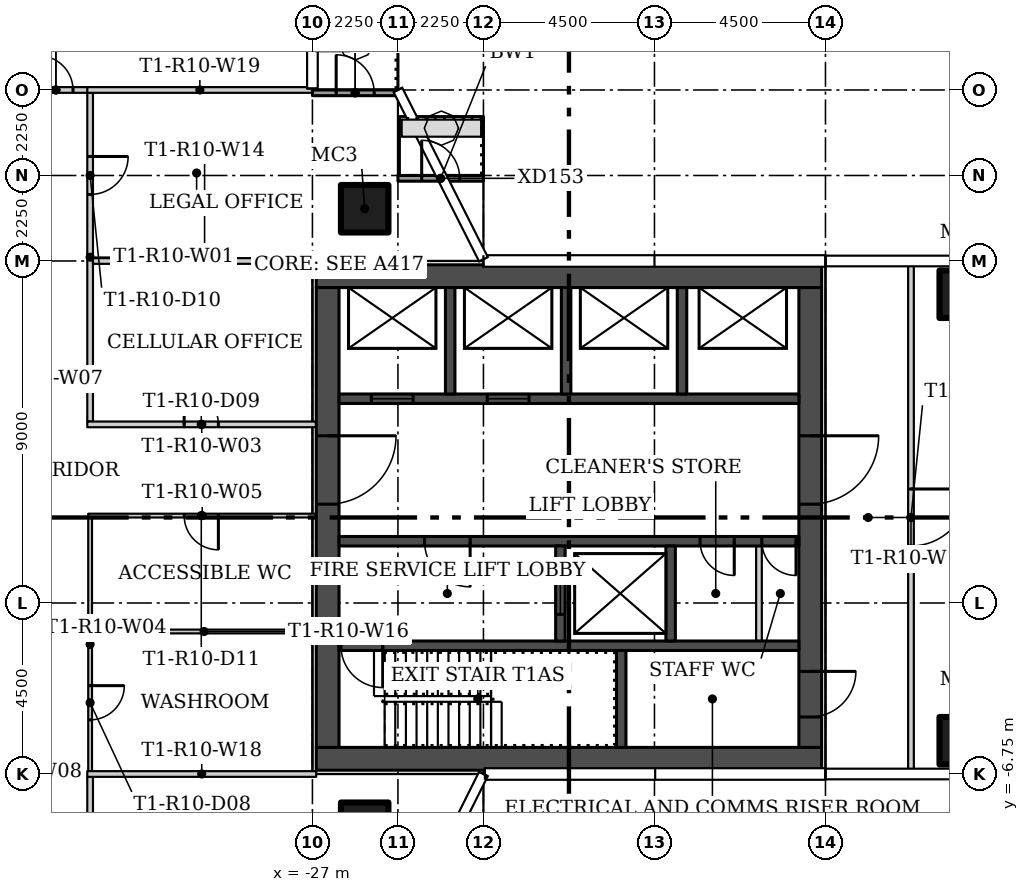
"""IFC4 building model, lengths in metres.
Left out: names, types, materials, properties, quantities, classifications, styles, units other than length and angle.
Written with IfcOpenShell. Run it as: python <this file> out.ifc"""

import sys

from ifc_helpers import new_model, si_unit, direction, frame, frame_2d, origin, origin_2d, place, context, subcontext, project, spatial, rectangle, hollow_rectangle, extrude, element, fill, save


model = new_model("IFC4")
c1 = context("Model", 3, precision=1e-05, world=origin(), true_north=direction((0.0, 1.0)))
c2 = subcontext(c1, "Body", "Model", "MODEL_VIEW")
j1 = project(units=[si_unit("LENGTHUNIT", "METRE"), si_unit("PLANEANGLEUNIT", "RADIAN")], contexts=[c1])
p1 = place(None, origin())
s1 = spatial("IfcSite", under=j1, at=p1, CompositionType="ELEMENT")
p2 = place(p1, origin())
s2 = spatial("IfcBuilding", under=s1, at=p2, CompositionType="ELEMENT")
p3 = place(p2, frame((0.0, 0.0, 105.3)))
s3 = spatial("IfcBuildingStorey", under=s2, at=p3, CompositionType="ELEMENT", Elevation=105.3)
for number, where in (
    (1, (-25.625, 8.125, 0.0)),
    (2, (-25.625, -8.125, 0.0)),
    (3, (-9.875, -5.875, 0.0)),
    (4, (-9.875, 5.875, 0.0)),
):
    element("IfcColumn", number, at=place(p3, frame(where)), inside=s3, PredefinedType="COLUMN", context=c2, shape_type="SweptSolid", body=[
        extrude(hollow_rectangle(XDim=1.25, YDim=1.25, WallThickness=0.05, at=origin_2d()), origin(), (0.0, 0.0, 1.0), 3.55),
    ])
p4 = place(p3, frame((-32.85, 11.175, 0.0), z_axis=(0.0, 0.0, 1.0), x_axis=(0.0, -1.0, 0.0)))
e5 = element("IfcWall", 5, at=p4, inside=s3, PredefinedType="PARTITIONING", context=c2, shape_type="SweptSolid", body=[
    extrude(rectangle(XDim=8.65, YDim=0.15, at=frame_2d((4.325, 0.0))), origin(), (0.0, 0.0, 1.0), 3.55),
])
p5 = place(p4, frame((1.675, 0.0, 0.0)))
e6 = element("IfcOpeningElement", 6, at=p5, cuts=e5, PredefinedType="OPENING", context=c2, shape_type="SweptSolid", body=[
    extrude(rectangle(XDim=1.0, YDim=2.4, at=frame_2d((0.5, 1.2))), frame((0.0, 0.085, 0.0), z_axis=(0.0, -1.0, 0.0), x_axis=(1.0, 0.0, 0.0)), (0.0, 0.0, 1.0), 0.17),
])
p6 = place(p3, frame((-32.85, -6.825, 0.0), z_axis=(0.0, 0.0, 1.0), x_axis=(0.0, -1.0, 0.0)))
e7 = element("IfcWall", 7, at=p6, inside=s3, PredefinedType="PARTITIONING", context=c2, shape_type="SweptSolid", body=[
    extrude(rectangle(XDim=4.35, YDim=0.15, at=frame_2d((2.175, 0.0))), origin(), (0.0, 0.0, 1.0), 3.55),
])
p7 = place(p6, frame((1.425, 0.0, 0.0)))
e8 = element("IfcOpeningElement", 8, at=p7, cuts=e7, PredefinedType="OPENING", context=c2, shape_type="SweptSolid", body=[
    extrude(rectangle(XDim=1.5, YDim=2.1, at=frame_2d((0.75, 1.05))), frame((0.0, 0.085, 0.0), z_axis=(0.0, -1.0, 0.0), x_axis=(1.0, 0.0, 0.0)), (0.0, 0.0, 1.0), 0.17),
])
p8 = place(p3, frame((-32.925, 2.45, 0.0)))
e9 = element("IfcWall", 9, at=p8, inside=s3, PredefinedType="PARTITIONING", context=c2, shape_type="SweptSolid", body=[
    extrude(rectangle(XDim=6.025, YDim=0.15, at=frame_2d((3.012, 0.0))), origin(), (0.0, 0.0, 1.0), 3.55),
])
p9 = place(p8, frame((2.55, 0.0, 0.0)))
e10 = element("IfcOpeningElement", 10, at=p9, cuts=e9, PredefinedType="OPENING", context=c2, shape_type="SweptSolid", body=[
    extrude(rectangle(XDim=0.9, YDim=2.1, at=frame_2d((0.45, 1.05))), frame((0.0, 0.085, 0.0), z_axis=(0.0, -1.0, 0.0), x_axis=(1.0, 0.0, 0.0)), (0.0, 0.0, 1.0), 0.17),
])
p10 = place(p3, frame((-32.85, -0.0, 0.0), z_axis=(0.0, 0.0, 1.0), x_axis=(0.0, -1.0, 0.0)))
e11 = element("IfcWall", 11, at=p10, inside=s3, PredefinedType="PARTITIONING", context=c2, shape_type="SweptSolid", body=[
    extrude(rectangle(XDim=6.675, YDim=0.1, at=frame_2d((3.337, 0.0))), origin(), (0.0, 0.0, 1.0), 3.55),
])
p11 = place(p10, frame((4.425, 0.0, 0.0)))
e12 = element("IfcOpeningElement", 12, at=p11, cuts=e11, PredefinedType="OPENING", context=c2, shape_type="SweptSolid", body=[
    extrude(rectangle(XDim=0.9, YDim=2.1, at=frame_2d((0.45, 1.05))), frame((0.0, 0.06, 0.0), z_axis=(0.0, -1.0, 0.0), x_axis=(1.0, 0.0, 0.0)), (0.0, 0.0, 1.0), 0.12),
])
p12 = place(p3, frame((-26.9, 0.05, 0.0), z_axis=(0.0, 0.0, 1.0), x_axis=(-1.0, 0.0, 0.0)))
e13 = element("IfcWall", 13, at=p12, inside=s3, PredefinedType="PARTITIONING", context=c2, shape_type="SweptSolid", body=[
    extrude(rectangle(XDim=6.0, YDim=0.1, at=frame_2d((3.0, 0.0))), origin(), (0.0, 0.0, 1.0), 3.55),
])
p13 = place(p12, frame((2.575, 0.0, 0.0)))
e14 = element("IfcOpeningElement", 14, at=p13, cuts=e13, PredefinedType="OPENING", context=c2, shape_type="SweptSolid", body=[
    extrude(rectangle(XDim=0.9, YDim=2.1, at=frame_2d((0.45, 1.05))), frame((0.0, 0.06, 0.0), z_axis=(0.0, -1.0, 0.0), x_axis=(1.0, 0.0, 0.0)), (0.0, 0.0, 1.0), 0.12),
])
p14 = place(p3, frame((-34.725, 11.25, 0.0)))
e15 = element("IfcWall", 15, at=p14, inside=s3, PredefinedType="PARTITIONING", context=c2, shape_type="SweptSolid", body=[
    extrude(rectangle(XDim=1.951, YDim=0.15, at=frame_2d((0.975, 0.0))), origin(), (0.0, 0.0, 1.0), 3.55),
])
p15 = place(p14, frame((0.525, 0.0, 0.0)))
e16 = element("IfcOpeningElement", 16, at=p15, cuts=e15, PredefinedType="OPENING", context=c2, shape_type="SweptSolid", body=[
    extrude(rectangle(XDim=0.9, YDim=2.1, at=frame_2d((0.45, 1.05))), frame((0.0, 0.085, 0.0), z_axis=(0.0, -1.0, 0.0), x_axis=(1.0, 0.0, 0.0)), (0.0, 0.0, 1.0), 0.17),
])
p16 = place(p3, frame((-11.25, 6.655, 0.0), z_axis=(0.0, 0.0, 1.0), x_axis=(0.0, -1.0, 0.0)))
e17 = element("IfcWall", 17, at=p16, inside=s3, PredefinedType="PARTITIONING", context=c2, shape_type="SweptSolid", body=[
    extrude(rectangle(XDim=13.31, YDim=0.15, at=frame_2d((6.655, 0.0))), origin(), (0.0, 0.0, 1.0), 3.55),
])
p17 = place(p16, frame((5.905, 0.0, 0.0)))
e18 = element("IfcOpeningElement", 18, at=p17, cuts=e17, PredefinedType="OPENING", context=c2, shape_type="SweptSolid", body=[
    extrude(rectangle(XDim=1.5, YDim=2.1, at=frame_2d((0.75, 1.05))), frame((0.0, 0.085, 0.0), z_axis=(0.0, -1.0, 0.0), x_axis=(1.0, 0.0, 0.0)), (0.0, 0.0, 1.0), 0.17),
])
p18 = place(p3, frame((-26.9, 6.75, 0.0), z_axis=(0.0, 0.0, 1.0), x_axis=(-1.0, 0.0, 0.0)))
e19 = element("IfcWall", 19, at=p18, inside=s3, PredefinedType="PARTITIONING", context=c2, shape_type="SweptSolid", body=[
    extrude(rectangle(XDim=5.875, YDim=0.15, at=frame_2d((2.938, 0.0))), origin(), (0.0, 0.0, 1.0), 3.55),
])
p19 = place(p3, frame((-26.9, -3.0, 0.0), z_axis=(0.0, 0.0, 1.0), x_axis=(-1.0, 0.0, 0.0)))
e20 = element("IfcWall", 20, at=p19, inside=s3, PredefinedType="PARTITIONING", context=c2, shape_type="SweptSolid", body=[
    extrude(rectangle(XDim=5.9, YDim=0.1, at=frame_2d((2.95, 0.0))), origin(), (0.0, 0.0, 1.0), 3.55),
])
p20 = place(p3, frame((-32.925, -6.75, 0.0)))
e21 = element("IfcWall", 21, at=p20, inside=s3, PredefinedType="PARTITIONING", context=c2, shape_type="SweptSolid", body=[
    extrude(rectangle(XDim=6.025, YDim=0.15, at=frame_2d((3.012, 0.0))), origin(), (0.0, 0.0, 1.0), 3.55),
])
p21 = place(p3, frame((-27.0, 11.25, 0.0), z_axis=(0.0, 0.0, 1.0), x_axis=(-1.0, 0.0, 0.0)))
e22 = element("IfcWall", 22, at=p21, inside=s3, PredefinedType="PARTITIONING", context=c2, shape_type="SweptSolid", body=[
    extrude(rectangle(XDim=5.925, YDim=0.15, at=frame_2d((2.962, 0.0))), origin(), (0.0, 0.0, 1.0), 3.55),
])
p22 = place(p3, frame((-24.75, 8.925, 0.0)))
e23 = element("IfcWall", 23, at=p22, inside=s3, PredefinedType="SOLIDWALL", context=c2, shape_type="SweptSolid", body=[
    extrude(rectangle(XDim=2.25, YDim=0.15, at=frame_2d((1.125, 0.0))), origin(), (0.0, 0.0, 1.0), 3.45),
])
p23 = place(p22, frame((0.625, 0.0, 0.0)))
e24 = element("IfcOpeningElement", 24, at=p23, cuts=e23, PredefinedType="OPENING", context=c2, shape_type="SweptSolid", body=[
    extrude(rectangle(XDim=1.0, YDim=2.4, at=frame_2d((0.5, 1.2))), frame((0.0, 0.085, 0.0), z_axis=(0.0, -1.0, 0.0), x_axis=(1.0, 0.0, 0.0)), (0.0, 0.0, 1.0), 0.17),
])
p24 = place(p3, frame((-27.0, 11.175, 0.0)))
e25 = element("IfcWall", 25, at=p24, inside=s3, PredefinedType="SOLIDWALL", context=c2, shape_type="SweptSolid", body=[
    extrude(rectangle(XDim=2.25, YDim=0.15, at=frame_2d((1.125, 0.0))), origin(), (0.0, 0.0, 1.0), 3.45),
])
p25 = place(p24, frame((0.625, 0.0, 0.0)))
e26 = element("IfcOpeningElement", 26, at=p25, cuts=e25, PredefinedType="OPENING", context=c2, shape_type="SweptSolid", body=[
    extrude(rectangle(XDim=1.0, YDim=2.4, at=frame_2d((0.5, 1.2))), frame((0.0, 0.085, 0.0), z_axis=(0.0, -1.0, 0.0), x_axis=(1.0, 0.0, 0.0)), (0.0, 0.0, 1.0), 0.17),
])
for number, where in (
    (27, (-26.9, -6.35, 0.0)),
    (28, (-26.9, 6.35, 0.0)),
):
    element("IfcWall", number, at=place(p3, frame(where)), inside=s3, PredefinedType="SHEAR", context=c2, shape_type="SweptSolid", body=[
        extrude(rectangle(XDim=13.3, YDim=0.6, at=frame_2d((6.65, 0.0))), origin(), (0.0, 0.0, 1.0), 3.55),
    ])
p26 = place(p3, frame((-26.6, 6.05, 0.0), z_axis=(0.0, 0.0, 1.0), x_axis=(0.0, -1.0, 0.0)))
e29 = element("IfcWall", 29, at=p26, inside=s3, PredefinedType="SHEAR", context=c2, shape_type="SweptSolid", body=[
    extrude(rectangle(XDim=12.1, YDim=0.6, at=frame_2d((6.05, 0.0))), origin(), (0.0, 0.0, 1.0), 3.55),
])
p27 = place(p26, frame((3.9, 0.0, 0.0)))
e30 = element("IfcOpeningElement", 30, at=p27, cuts=e29, PredefinedType="OPENING", context=c2, shape_type="SweptSolid", body=[
    extrude(rectangle(XDim=1.8, YDim=2.4, at=frame_2d((0.9, 1.2))), frame((0.0, 0.31, 0.0), z_axis=(0.0, -1.0, 0.0), x_axis=(1.0, 0.0, 0.0)), (0.0, 0.0, 1.0), 0.62),
])
p28 = place(p3, frame((-13.9, 6.05, 0.0), z_axis=(0.0, 0.0, 1.0), x_axis=(0.0, -1.0, 0.0)))
e31 = element("IfcWall", 31, at=p28, inside=s3, PredefinedType="SHEAR", context=c2, shape_type="SweptSolid", body=[
    extrude(rectangle(XDim=12.1, YDim=0.6, at=frame_2d((6.05, 0.0))), origin(), (0.0, 0.0, 1.0), 3.55),
])
p29 = place(p28, frame((10.1, 0.0, 0.0)))
e32 = element("IfcOpeningElement", 32, at=p29, cuts=e31, PredefinedType="OPENING", context=c2, shape_type="SweptSolid", body=[
    extrude(rectangle(XDim=1.2, YDim=2.1, at=frame_2d((0.6, 1.05))), frame((0.0, 0.31, 0.0), z_axis=(0.0, -1.0, 0.0), x_axis=(1.0, 0.0, 0.0)), (0.0, 0.0, 1.0), 0.62),
])
p30 = place(p28, frame((3.9, 0.0, 0.0)))
e33 = element("IfcOpeningElement", 33, at=p30, cuts=e31, PredefinedType="OPENING", context=c2, shape_type="SweptSolid", body=[
    extrude(rectangle(XDim=1.8, YDim=2.4, at=frame_2d((0.9, 1.2))), frame((0.0, 0.31, 0.0), z_axis=(0.0, -1.0, 0.0), x_axis=(1.0, 0.0, 0.0)), (0.0, 0.0, 1.0), 0.62),
])
p31 = place(p3, frame((-14.2, -3.375, 0.0), z_axis=(0.0, 0.0, 1.0), x_axis=(-1.0, 0.0, 0.0)))
e34 = element("IfcWall", 34, at=p31, inside=s3, PredefinedType="SHEAR", context=c2, shape_type="SweptSolid", body=[
    extrude(rectangle(XDim=12.1, YDim=0.25, at=frame_2d((6.05, 0.0))), origin(), (0.0, 0.0, 1.0), 3.55),
])
p32 = place(p31, frame((10.95, 0.0, 0.0)))
e35 = element("IfcOpeningElement", 35, at=p32, cuts=e34, PredefinedType="OPENING", context=c2, shape_type="SweptSolid", body=[
    extrude(rectangle(XDim=1.1, YDim=2.1, at=frame_2d((0.55, 1.05))), frame((0.0, 0.135, 0.0), z_axis=(0.0, -1.0, 0.0), x_axis=(1.0, 0.0, 0.0)), (0.0, 0.0, 1.0), 0.27),
])
p33 = place(p3, frame((-18.875, -6.05, 0.0), z_axis=(0.0, 0.0, 1.0), x_axis=(0.0, 1.0, 0.0)))
e36 = element("IfcWall", 36, at=p33, inside=s3, PredefinedType="SHEAR", context=c2, shape_type="SweptSolid", body=[
    extrude(rectangle(XDim=2.55, YDim=0.25, at=frame_2d((1.275, 0.0))), origin(), (0.0, 0.0, 1.0), 3.55),
])
p34 = place(p3, frame((-14.2, -0.625, 0.0), z_axis=(0.0, 0.0, 1.0), x_axis=(-1.0, 0.0, 0.0)))
e37 = element("IfcWall", 37, at=p34, inside=s3, PredefinedType="SHEAR", context=c2, shape_type="SweptSolid", body=[
    extrude(rectangle(XDim=12.1, YDim=0.25, at=frame_2d((6.05, 0.0))), origin(), (0.0, 0.0, 1.0), 3.55),
])
p35 = place(p34, frame((8.65, 0.0, 0.0)))
e38 = element("IfcOpeningElement", 38, at=p35, cuts=e37, PredefinedType="OPENING", context=c2, shape_type="SweptSolid", body=[
    extrude(rectangle(XDim=1.2, YDim=2.1, at=frame_2d((0.6, 1.05))), frame((0.0, 0.135, 0.0), z_axis=(0.0, -1.0, 0.0), x_axis=(1.0, 0.0, 0.0)), (0.0, 0.0, 1.0), 0.27),
])
p36 = place(p34, frame((1.7, 0.0, 0.0)))
e39 = element("IfcOpeningElement", 39, at=p36, cuts=e37, PredefinedType="OPENING", context=c2, shape_type="SweptSolid", body=[
    extrude(rectangle(XDim=0.9, YDim=2.1, at=frame_2d((0.45, 1.05))), frame((0.0, 0.135, 0.0), z_axis=(0.0, -1.0, 0.0), x_axis=(1.0, 0.0, 0.0)), (0.0, 0.0, 1.0), 0.27),
])
p37 = place(p34, frame((0.075, 0.0, 0.0)))
e40 = element("IfcOpeningElement", 40, at=p37, cuts=e37, PredefinedType="OPENING", context=c2, shape_type="SweptSolid", body=[
    extrude(rectangle(XDim=0.9, YDim=2.1, at=frame_2d((0.45, 1.05))), frame((0.0, 0.135, 0.0), z_axis=(0.0, -1.0, 0.0), x_axis=(1.0, 0.0, 0.0)), (0.0, 0.0, 1.0), 0.27),
])
p38 = place(p3, frame((-20.475, -3.25, 0.0), z_axis=(0.0, 0.0, 1.0), x_axis=(0.0, 1.0, 0.0)))
e41 = element("IfcWall", 41, at=p38, inside=s3, PredefinedType="SHEAR", context=c2, shape_type="SweptSolid", body=[
    extrude(rectangle(XDim=2.5, YDim=0.25, at=frame_2d((1.25, 0.0))), origin(), (0.0, 0.0, 1.0), 3.55),
])
p39 = place(p38, frame((0.7, 0.0, 0.0)))
e42 = element("IfcOpeningElement", 42, at=p39, cuts=e41, PredefinedType="OPENING", context=c2, shape_type="SweptSolid", body=[
    extrude(rectangle(XDim=1.1, YDim=2.1, at=frame_2d((0.55, 1.05))), frame((0.0, 0.135, 0.0), z_axis=(0.0, -1.0, 0.0), x_axis=(1.0, 0.0, 0.0)), (0.0, 0.0, 1.0), 0.27),
])
p40 = place(p3, frame((-17.575, -3.25, 0.0), z_axis=(0.0, 0.0, 1.0), x_axis=(0.0, 1.0, 0.0)))
e43 = element("IfcWall", 43, at=p40, inside=s3, PredefinedType="SHEAR", context=c2, shape_type="SweptSolid", body=[
    extrude(rectangle(XDim=2.5, YDim=0.25, at=frame_2d((1.25, 0.0))), origin(), (0.0, 0.0, 1.0), 3.55),
])
p41 = place(p3, frame((-15.25, -3.25, 0.0), z_axis=(0.0, 0.0, 1.0), x_axis=(0.0, 1.0, 0.0)))
e44 = element("IfcWall", 44, at=p41, inside=s3, PredefinedType="PARTITIONING", context=c2, shape_type="SweptSolid", body=[
    extrude(rectangle(XDim=2.5, YDim=0.15, at=frame_2d((1.25, 0.0))), origin(), (0.0, 0.0, 1.0), 3.55),
])
p42 = place(p3, frame((-26.3, 3.125, 0.0)))
e45 = element("IfcWall", 45, at=p42, inside=s3, PredefinedType="SHEAR", context=c2, shape_type="SweptSolid", body=[
    extrude(rectangle(XDim=12.1, YDim=0.25, at=frame_2d((6.05, 0.0))), origin(), (0.0, 0.0, 1.0), 3.55),
])
p43 = place(p42, frame((0.85, 0.0, 0.0)))
e46 = element("IfcOpeningElement", 46, at=p43, cuts=e45, PredefinedType="OPENING", context=c2, shape_type="SweptSolid", body=[
    extrude(rectangle(XDim=1.1, YDim=2.1, at=frame_2d((0.55, 1.05))), frame((0.0, 0.135, 0.0), z_axis=(0.0, -1.0, 0.0), x_axis=(1.0, 0.0, 0.0)), (0.0, 0.0, 1.0), 0.27),
])
p44 = place(p42, frame((3.9, 0.0, 0.0)))
e47 = element("IfcOpeningElement", 47, at=p44, cuts=e45, PredefinedType="OPENING", context=c2, shape_type="SweptSolid", body=[
    extrude(rectangle(XDim=1.1, YDim=2.1, at=frame_2d((0.55, 1.05))), frame((0.0, 0.135, 0.0), z_axis=(0.0, -1.0, 0.0), x_axis=(1.0, 0.0, 0.0)), (0.0, 0.0, 1.0), 0.27),
])
for number, where, z_axis, x_axis in (
    (48, (-23.375, 3.25, 0.0), (0.0, 0.0, 1.0), (0.0, 1.0, 0.0)),
    (49, (-20.325, 3.25, 0.0), (0.0, 0.0, 1.0), (0.0, 1.0, 0.0)),
    (50, (-17.275, 3.25, 0.0), (0.0, 0.0, 1.0), (0.0, 1.0, 0.0)),
):
    element("IfcWall", number, at=place(p3, frame(where, z_axis=z_axis, x_axis=x_axis)), inside=s3, PredefinedType="SHEAR", context=c2, shape_type="SweptSolid", body=[
        extrude(rectangle(XDim=2.8, YDim=0.25, at=frame_2d((1.4, 0.0))), origin(), (0.0, 0.0, 1.0), 3.55),
    ])
p45 = place(p15, origin())
e51 = element("IfcDoor", 51, at=p45, inside=s3, OperationType="SINGLE_SWING_LEFT", PredefinedType="DOOR", context=c2, shape_type="SweptSolid", body=[
    extrude(rectangle(XDim=0.9, YDim=2.1, at=frame_2d((0.45, 1.05))), frame((0.0, 0.025, 0.0), z_axis=(0.0, -1.0, 0.0), x_axis=(1.0, 0.0, 0.0)), (0.0, 0.0, 1.0), 0.05),
])
fill(e16, e51)
p46 = place(p11, origin())
e52 = element("IfcDoor", 52, at=p46, inside=s3, OperationType="SINGLE_SWING_LEFT", PredefinedType="DOOR", context=c2, shape_type="SweptSolid", body=[
    extrude(rectangle(XDim=0.9, YDim=2.1, at=frame_2d((0.45, 1.05))), frame((0.0, 0.025, 0.0), z_axis=(0.0, -1.0, 0.0), x_axis=(1.0, 0.0, 0.0)), (0.0, 0.0, 1.0), 0.05),
])
fill(e12, e52)
p47 = place(p9, origin())
e53 = element("IfcDoor", 53, at=p47, inside=s3, OperationType="SINGLE_SWING_LEFT", PredefinedType="DOOR", context=c2, shape_type="SweptSolid", body=[
    extrude(rectangle(XDim=0.9, YDim=2.1, at=frame_2d((0.45, 1.05))), frame((0.0, 0.025, 0.0), z_axis=(0.0, -1.0, 0.0), x_axis=(1.0, 0.0, 0.0)), (0.0, 0.0, 1.0), 0.05),
])
fill(e10, e53)
p48 = place(p5, origin())
e54 = element("IfcDoor", 54, at=p48, inside=s3, OperationType="SINGLE_SWING_RIGHT", PredefinedType="DOOR", context=c2, shape_type="SweptSolid", body=[
    extrude(rectangle(XDim=1.0, YDim=2.4, at=frame_2d((0.5, 1.2))), frame((0.0, 0.025, 0.0), z_axis=(0.0, -1.0, 0.0), x_axis=(1.0, 0.0, 0.0)), (0.0, 0.0, 1.0), 0.05),
])
fill(e6, e54)
p49 = place(p13, origin())
e55 = element("IfcDoor", 55, at=p49, inside=s3, OperationType="SINGLE_SWING_RIGHT", PredefinedType="DOOR", context=c2, shape_type="SweptSolid", body=[
    extrude(rectangle(XDim=0.9, YDim=2.1, at=frame_2d((0.45, 1.05))), frame((0.0, 0.025, 0.0), z_axis=(0.0, -1.0, 0.0), x_axis=(1.0, 0.0, 0.0)), (0.0, 0.0, 1.0), 0.05),
])
fill(e14, e55)
p50 = place(p17, origin())
e56 = element("IfcDoor", 56, at=p50, inside=s3, OperationType="DOUBLE_DOOR_SINGLE_SWING", PredefinedType="DOOR", context=c2, shape_type="SweptSolid", body=[
    extrude(rectangle(XDim=1.5, YDim=2.1, at=frame_2d((0.75, 1.05))), frame((0.0, 0.025, 0.0), z_axis=(0.0, -1.0, 0.0), x_axis=(1.0, 0.0, 0.0)), (0.0, 0.0, 1.0), 0.05),
])
fill(e18, e56)
p51 = place(p23, origin())
e57 = element("IfcDoor", 57, at=p51, inside=s3, OperationType="SINGLE_SWING_RIGHT", PredefinedType="DOOR", context=c2, shape_type="SweptSolid", body=[
    extrude(rectangle(XDim=1.0, YDim=2.4, at=frame_2d((0.5, 1.2))), frame((0.0, 0.025, 0.0), z_axis=(0.0, -1.0, 0.0), x_axis=(1.0, 0.0, 0.0)), (0.0, 0.0, 1.0), 0.05),
])
fill(e24, e57)
p52 = place(p25, origin())
e58 = element("IfcDoor", 58, at=p52, inside=s3, OperationType="SINGLE_SWING_LEFT", PredefinedType="DOOR", context=c2, shape_type="SweptSolid", body=[
    extrude(rectangle(XDim=1.0, YDim=2.4, at=frame_2d((0.5, 1.2))), frame((0.0, 0.025, 0.0), z_axis=(0.0, -1.0, 0.0), x_axis=(1.0, 0.0, 0.0)), (0.0, 0.0, 1.0), 0.05),
])
fill(e26, e58)
p53 = place(p27, origin())
e59 = element("IfcDoor", 59, at=p53, inside=s3, OperationType="DOUBLE_DOOR_SINGLE_SWING", PredefinedType="DOOR", context=c2, shape_type="SweptSolid", body=[
    extrude(rectangle(XDim=1.8, YDim=2.4, at=frame_2d((0.9, 1.2))), frame((0.0, 0.025, 0.0), z_axis=(0.0, -1.0, 0.0), x_axis=(1.0, 0.0, 0.0)), (0.0, 0.0, 1.0), 0.05),
])
fill(e30, e59)
p54 = place(p29, origin())
e60 = element("IfcDoor", 60, at=p54, inside=s3, OperationType="SINGLE_SWING_RIGHT", PredefinedType="DOOR", context=c2, shape_type="SweptSolid", body=[
    extrude(rectangle(XDim=1.2, YDim=2.1, at=frame_2d((0.6, 1.05))), frame((0.0, 0.025, 0.0), z_axis=(0.0, -1.0, 0.0), x_axis=(1.0, 0.0, 0.0)), (0.0, 0.0, 1.0), 0.05),
])
fill(e32, e60)
p55 = place(p30, origin())
e61 = element("IfcDoor", 61, at=p55, inside=s3, OperationType="DOUBLE_DOOR_SINGLE_SWING", PredefinedType="DOOR", context=c2, shape_type="SweptSolid", body=[
    extrude(rectangle(XDim=1.8, YDim=2.4, at=frame_2d((0.9, 1.2))), frame((0.0, 0.025, 0.0), z_axis=(0.0, -1.0, 0.0), x_axis=(1.0, 0.0, 0.0)), (0.0, 0.0, 1.0), 0.05),
])
fill(e33, e61)
p56 = place(p32, origin())
e62 = element("IfcDoor", 62, at=p56, inside=s3, OperationType="SINGLE_SWING_RIGHT", PredefinedType="DOOR", context=c2, shape_type="SweptSolid", body=[
    extrude(rectangle(XDim=1.1, YDim=2.1, at=frame_2d((0.55, 1.05))), frame((0.0, 0.025, 0.0), z_axis=(0.0, -1.0, 0.0), x_axis=(1.0, 0.0, 0.0)), (0.0, 0.0, 1.0), 0.05),
])
fill(e35, e62)
p57 = place(p35, origin())
e63 = element("IfcDoor", 63, at=p57, inside=s3, OperationType="SINGLE_SWING_RIGHT", PredefinedType="DOOR", context=c2, shape_type="SweptSolid", body=[
    extrude(rectangle(XDim=1.2, YDim=2.1, at=frame_2d((0.6, 1.05))), frame((0.0, 0.025, 0.0), z_axis=(0.0, -1.0, 0.0), x_axis=(1.0, 0.0, 0.0)), (0.0, 0.0, 1.0), 0.05),
])
fill(e38, e63)
p58 = place(p36, origin())
e64 = element("IfcDoor", 64, at=p58, inside=s3, OperationType="SINGLE_SWING_LEFT", PredefinedType="DOOR", context=c2, shape_type="SweptSolid", body=[
    extrude(rectangle(XDim=0.9, YDim=2.1, at=frame_2d((0.45, 1.05))), frame((0.0, 0.025, 0.0), z_axis=(0.0, -1.0, 0.0), x_axis=(1.0, 0.0, 0.0)), (0.0, 0.0, 1.0), 0.05),
])
fill(e39, e64)
p59 = place(p37, origin())
e65 = element("IfcDoor", 65, at=p59, inside=s3, OperationType="SINGLE_SWING_LEFT", PredefinedType="DOOR", context=c2, shape_type="SweptSolid", body=[
    extrude(rectangle(XDim=0.9, YDim=2.1, at=frame_2d((0.45, 1.05))), frame((0.0, 0.025, 0.0), z_axis=(0.0, -1.0, 0.0), x_axis=(1.0, 0.0, 0.0)), (0.0, 0.0, 1.0), 0.05),
])
fill(e40, e65)
p60 = place(p39, origin())
e66 = element("IfcDoor", 66, at=p60, inside=s3, OperationType="SLIDING_TO_LEFT", PredefinedType="DOOR", context=c2, shape_type="SweptSolid", body=[
    extrude(rectangle(XDim=1.1, YDim=2.1, at=frame_2d((0.55, 1.05))), frame((0.0, 0.025, 0.0), z_axis=(0.0, -1.0, 0.0), x_axis=(1.0, 0.0, 0.0)), (0.0, 0.0, 1.0), 0.05),
])
fill(e42, e66)
p61 = place(p43, origin())
e67 = element("IfcDoor", 67, at=p61, inside=s3, OperationType="SLIDING_TO_LEFT", PredefinedType="DOOR", context=c2, shape_type="SweptSolid", body=[
    extrude(rectangle(XDim=1.1, YDim=2.1, at=frame_2d((0.55, 1.05))), frame((0.0, 0.025, 0.0), z_axis=(0.0, -1.0, 0.0), x_axis=(1.0, 0.0, 0.0)), (0.0, 0.0, 1.0), 0.05),
])
fill(e46, e67)
p62 = place(p44, origin())
e68 = element("IfcDoor", 68, at=p62, inside=s3, OperationType="SLIDING_TO_LEFT", PredefinedType="DOOR", context=c2, shape_type="SweptSolid", body=[
    extrude(rectangle(XDim=1.1, YDim=2.1, at=frame_2d((0.55, 1.05))), frame((0.0, 0.025, 0.0), z_axis=(0.0, -1.0, 0.0), x_axis=(1.0, 0.0, 0.0)), (0.0, 0.0, 1.0), 0.05),
])
fill(e47, e68)
save(model, sys.argv[1])
